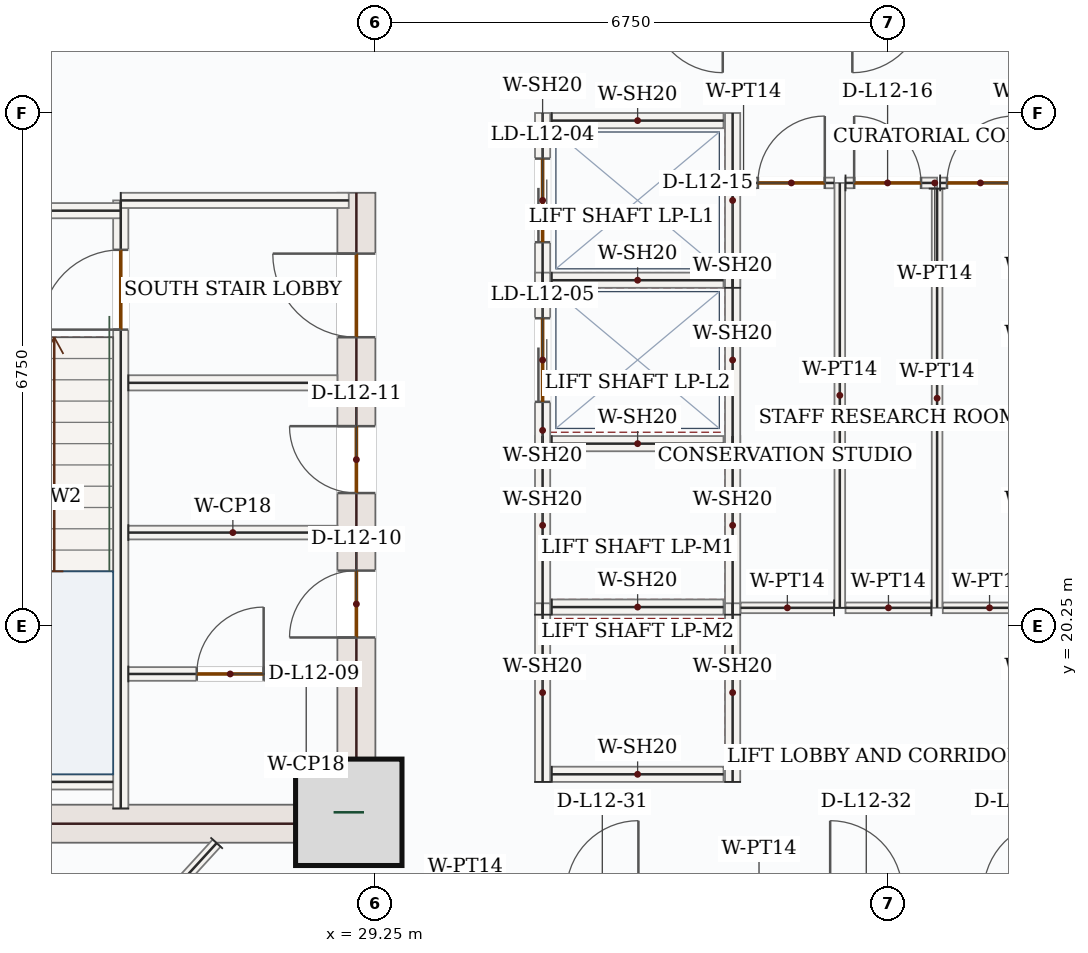
"""IFC4 building model, lengths in metres.
Left out: names, types, materials, properties, quantities, classifications, styles, units other than length and angle.
Written with IfcOpenShell. Run it as: python <this file> out.ifc"""

import sys

from ifc_helpers import new_model, si_unit, direction, frame, frame_2d, origin, origin_2d, place, context, subcontext, project, spatial, rectangle, extrude, source, transform, mapped, element, fill, save


model = new_model("IFC4")
c1 = context("Model", 3, precision=1e-05, world=origin(), true_north=direction((0.0, 1.0)))
c2 = subcontext(c1, "Body", "Model", "MODEL_VIEW")
j1 = project(units=[si_unit("LENGTHUNIT", "METRE"), si_unit("PLANEANGLEUNIT", "RADIAN")], contexts=[c1])
p1 = place(None, origin())
s1 = spatial("IfcSite", under=j1, at=p1, CompositionType="ELEMENT")
p2 = place(p1, origin())
s2 = spatial("IfcBuilding", under=s1, at=p2, CompositionType="ELEMENT")
p3 = place(p2, frame((0.0, 0.0, 58.5)))
s3 = spatial("IfcBuildingStorey", under=s2, at=p3, CompositionType="ELEMENT", Elevation=58.5)
p4 = place(p3, frame((29.0, 17.4, 0.0), z_axis=(0.0, 0.0, 1.0), x_axis=(0.0, 1.0, 0.0)))
e1 = element("IfcWall", 1, at=p4, inside=s3, PredefinedType="SHEAR", context=c2, shape_type="SweptSolid", body=[
    extrude(rectangle(XDim=8.55, YDim=0.5, at=frame_2d((4.275, 0.0))), origin(), (0.0, 0.0, 1.0), 3.95),
])
p5 = place(p4, frame((6.65, 0.0, 0.0)))
e2 = element("IfcOpeningElement", 2, at=p5, cuts=e1, PredefinedType="OPENING", context=c2, shape_type="SweptSolid", body=[
    extrude(rectangle(XDim=1.1, YDim=2.2, at=frame_2d((0.55, 1.1))), frame((0.0, 0.26, 0.0), z_axis=(0.0, -1.0, 0.0), x_axis=(1.0, 0.0, 0.0)), (0.0, 0.0, 1.0), 0.52),
])
p6 = place(p4, frame((2.7, 0.0, 0.0)))
e3 = element("IfcOpeningElement", 3, at=p6, cuts=e1, PredefinedType="OPENING", context=c2, shape_type="SweptSolid", body=[
    extrude(rectangle(XDim=0.88, YDim=2.1, at=frame_2d((0.44, 1.05))), frame((0.0, 0.26, 0.0), z_axis=(0.0, -1.0, 0.0), x_axis=(1.0, 0.0, 0.0)), (0.0, 0.0, 1.0), 0.52),
])
p7 = place(p4, frame((4.6, 0.0, 0.0)))
e4 = element("IfcOpeningElement", 4, at=p7, cuts=e1, PredefinedType="OPENING", context=c2, shape_type="SweptSolid", body=[
    extrude(rectangle(XDim=0.88, YDim=2.1, at=frame_2d((0.44, 1.05))), frame((0.0, 0.26, 0.0), z_axis=(0.0, -1.0, 0.0), x_axis=(1.0, 0.0, 0.0)), (0.0, 0.0, 1.0), 0.52),
])
m1 = source(origin(), c2, "Body", "SweptSolid", [
    extrude(rectangle(XDim=7.0, YDim=0.5, at=frame_2d((3.5, 0.0))), origin(), (0.0, 0.0, 1.0), 3.95),
])
p8 = place(p3, frame((21.75, 17.65, 0.0), z_axis=(0.0, 0.0, 1.0), x_axis=(1.0, 0.0, 0.0)))
e5 = element("IfcWall", 5, at=p8, inside=s3, PredefinedType="SHEAR", context=c2, shape_type="MappedRepresentation", body=[
    mapped(m1, transform((0.0, 0.0, 0.0), x_axis=(1.0, 0.0, 0.0), y_axis=(0.0, 1.0, 0.0), z_axis=(0.0, 0.0, 1.0), scale=1.0)),
])
m2 = source(origin(), c2, "Body", "SweptSolid", [
    extrude(rectangle(XDim=1.4, YDim=1.4, at=origin_2d()), origin(), (0.0, 0.0, 1.0), 4.2),
])
p9 = place(p3, frame((28.9, 17.8, 0.0), z_axis=(0.0, 0.0, 1.0), x_axis=(1.0, 0.0, 0.0)))
e6 = element("IfcColumn", 6, at=p9, inside=s3, PredefinedType="COLUMN", context=c2, shape_type="MappedRepresentation", body=[
    mapped(m2, transform((0.0, 0.0, 0.0), x_axis=(1.0, 0.0, 0.0), y_axis=(0.0, 1.0, 0.0), z_axis=(0.0, 0.0, 1.0), scale=1.0)),
])
p10 = place(p3, frame((25.9, 17.85, 0.0), z_axis=(0.0, 0.0, 1.0), x_axis=(0.0, 1.0, 0.0)))
e7 = element("IfcWall", 7, at=p10, inside=s3, PredefinedType="SOLIDWALL", context=c2, shape_type="SweptSolid", body=[
    extrude(rectangle(XDim=8.0, YDim=0.2, at=frame_2d((4.0, 0.0))), origin(), (0.0, 0.0, 1.0), 3.95),
])
p11 = place(p10, frame((6.3, 0.0, 0.0)))
e8 = element("IfcOpeningElement", 8, at=p11, cuts=e7, PredefinedType="OPENING", context=c2, shape_type="SweptSolid", body=[
    extrude(rectangle(XDim=1.05, YDim=2.15, at=frame_2d((0.525, 1.075))), frame((0.0, 0.11, 0.0), z_axis=(0.0, -1.0, 0.0), x_axis=(1.0, 0.0, 0.0)), (0.0, 0.0, 1.0), 0.22),
])
m3 = source(origin(), c2, "Body", "SweptSolid", [
    extrude(rectangle(XDim=4.25, YDim=0.2, at=frame_2d((2.125, 0.0))), origin(), (0.0, 0.0, 1.0), 3.95),
])
p12 = place(p3, frame((21.65, 25.715, 0.0), z_axis=(0.0, 0.0, 1.0), x_axis=(1.0, 0.0, 0.0)))
e9 = element("IfcWall", 9, at=p12, inside=s3, PredefinedType="SOLIDWALL", context=c2, shape_type="MappedRepresentation", body=[
    mapped(m3, transform((0.0, 0.0, 0.0), x_axis=(1.0, 0.0, 0.0), y_axis=(0.0, 1.0, 0.0), z_axis=(0.0, 0.0, 1.0), scale=1.0)),
])
m4 = source(origin(), c2, "Body", "SweptSolid", [
    extrude(rectangle(XDim=3.0, YDim=0.2, at=frame_2d((1.5, 0.0))), origin(), (0.0, 0.0, 1.0), 3.95),
])
p13 = place(p3, frame((25.9, 25.85, 0.0), z_axis=(0.0, 0.0, 1.0), x_axis=(1.0, 0.0, 0.0)))
e10 = element("IfcWall", 10, at=p13, inside=s3, PredefinedType="SOLIDWALL", context=c2, shape_type="MappedRepresentation", body=[
    mapped(m4, transform((0.0, 0.0, 0.0), x_axis=(1.0, 0.0, 0.0), y_axis=(0.0, 1.0, 0.0), z_axis=(0.0, 0.0, 1.0), scale=1.0)),
])
m5 = source(origin(), c2, "Body", "SweptSolid", [
    extrude(rectangle(XDim=3.25, YDim=0.2, at=frame_2d((1.625, 0.0))), origin(), (0.0, 0.0, 1.0), 3.95),
])
p14 = place(p3, frame((22.55, 18.2, 0.0), z_axis=(0.0, 0.0, 1.0), x_axis=(1.0, 0.0, 0.0)))
e11 = element("IfcWall", 11, at=p14, inside=s3, PredefinedType="SOLIDWALL", context=c2, shape_type="MappedRepresentation", body=[
    mapped(m5, transform((0.0, 0.0, 0.0), x_axis=(1.0, 0.0, 0.0), y_axis=(0.0, 1.0, 0.0), z_axis=(0.0, 0.0, 1.0), scale=1.0)),
])
m6 = source(origin(), c2, "Body", "SweptSolid", [
    extrude(rectangle(XDim=2.75, YDim=0.2, at=frame_2d((1.375, 0.0))), origin(), (0.0, 0.0, 1.0), 3.95),
])
p15 = place(p3, frame((26.0, 23.45, 0.0), z_axis=(0.0, 0.0, 1.0), x_axis=(1.0, 0.0, 0.0)))
e12 = element("IfcWall", 12, at=p15, inside=s3, PredefinedType="SOLIDWALL", context=c2, shape_type="MappedRepresentation", body=[
    mapped(m6, transform((0.0, 0.0, 0.0), x_axis=(1.0, 0.0, 0.0), y_axis=(0.0, 1.0, 0.0), z_axis=(0.0, 0.0, 1.0), scale=1.0)),
])
p16 = place(p3, frame((26.0, 19.62, 0.0), z_axis=(0.0, 0.0, 1.0), x_axis=(1.0, 0.0, 0.0)))
e13 = element("IfcWall", 13, at=p16, inside=s3, PredefinedType="PARTITIONING", context=c2, shape_type="SweptSolid", body=[
    extrude(rectangle(XDim=2.75, YDim=0.18, at=frame_2d((1.375, 0.0))), origin(), (0.0, 0.0, 1.0), 3.95),
])
p17 = place(p16, frame((0.9, 0.0, 0.0)))
e14 = element("IfcOpeningElement", 14, at=p17, cuts=e13, PredefinedType="OPENING", context=c2, shape_type="SweptSolid", body=[
    extrude(rectangle(XDim=0.88, YDim=2.1, at=frame_2d((0.44, 1.05))), frame((0.0, 0.1, 0.0), z_axis=(0.0, -1.0, 0.0), x_axis=(1.0, 0.0, 0.0)), (0.0, 0.0, 1.0), 0.2),
])
m7 = source(origin(), c2, "Body", "SweptSolid", [
    extrude(rectangle(XDim=2.75, YDim=0.18, at=frame_2d((1.375, 0.0))), origin(), (0.0, 0.0, 1.0), 3.95),
])
p18 = place(p3, frame((26.0, 21.48, 0.0), z_axis=(0.0, 0.0, 1.0), x_axis=(1.0, 0.0, 0.0)))
e15 = element("IfcWall", 15, at=p18, inside=s3, PredefinedType="PARTITIONING", context=c2, shape_type="MappedRepresentation", body=[
    mapped(m7, transform((0.0, 0.0, 0.0), x_axis=(1.0, 0.0, 0.0), y_axis=(0.0, 1.0, 0.0), z_axis=(0.0, 0.0, 1.0), scale=1.0)),
])
m8 = source(origin(), c2, "Body", "SweptSolid", [
    extrude(rectangle(XDim=2.35, YDim=0.2, at=frame_2d((1.175, 0.0))), origin(), (0.0, 0.0, 1.0), 3.95),
])
for number, where, z_axis, x_axis in (
    (16, (31.45, 20.4, 0.0), (0.0, 0.0, 1.0), (0.0, 1.0, 0.0)),
    (17, (33.95, 20.4, 0.0), (0.0, 0.0, 1.0), (0.0, 1.0, 0.0)),
):
    element("IfcWall", number, at=place(p3, frame(where, z_axis=z_axis, x_axis=x_axis)), inside=s3, PredefinedType="SOLIDWALL", context=c2, shape_type="MappedRepresentation", body=[
        mapped(m8, transform((0.0, 0.0, 0.0), x_axis=(1.0, 0.0, 0.0), y_axis=(0.0, 1.0, 0.0), z_axis=(0.0, 0.0, 1.0), scale=1.0)),
    ])
m9 = source(origin(), c2, "Body", "SweptSolid", [
    extrude(rectangle(XDim=2.26, YDim=0.2, at=frame_2d((1.13, 0.0))), origin(), (0.0, 0.0, 1.0), 3.95),
])
for number, where, z_axis, x_axis in (
    (18, (31.57, 20.5, 0.0), (0.0, 0.0, 1.0), (1.0, 0.0, 0.0)),
    (19, (31.57, 22.65, 0.0), (0.0, 0.0, 1.0), (1.0, 0.0, 0.0)),
):
    element("IfcWall", number, at=place(p3, frame(where, z_axis=z_axis, x_axis=x_axis)), inside=s3, PredefinedType="SOLIDWALL", context=c2, shape_type="MappedRepresentation", body=[
        mapped(m9, transform((0.0, 0.0, 0.0), x_axis=(1.0, 0.0, 0.0), y_axis=(0.0, 1.0, 0.0), z_axis=(0.0, 0.0, 1.0), scale=1.0)),
    ])
for number, where, z_axis, x_axis in (
    (20, (31.45, 18.2, 0.0), (0.0, 0.0, 1.0), (0.0, 1.0, 0.0)),
    (21, (33.95, 18.2, 0.0), (0.0, 0.0, 1.0), (0.0, 1.0, 0.0)),
):
    element("IfcWall", number, at=place(p3, frame(where, z_axis=z_axis, x_axis=x_axis)), inside=s3, PredefinedType="SOLIDWALL", context=c2, shape_type="MappedRepresentation", body=[
        mapped(m8, transform((0.0, 0.0, 0.0), x_axis=(1.0, 0.0, 0.0), y_axis=(0.0, 1.0, 0.0), z_axis=(0.0, 0.0, 1.0), scale=1.0)),
    ])
p19 = place(p3, frame((31.57, 18.3, 0.0), z_axis=(0.0, 0.0, 1.0), x_axis=(1.0, 0.0, 0.0)))
e22 = element("IfcWall", 22, at=p19, inside=s3, PredefinedType="SOLIDWALL", context=c2, shape_type="MappedRepresentation", body=[
    mapped(m9, transform((0.0, 0.0, 0.0), x_axis=(1.0, 0.0, 0.0), y_axis=(0.0, 1.0, 0.0), z_axis=(0.0, 0.0, 1.0), scale=1.0)),
])
p20 = place(p3, frame((31.45, 24.7, 0.0), z_axis=(0.0, 0.0, 1.0), x_axis=(0.0, 1.0, 0.0)))
e23 = element("IfcWall", 23, at=p20, inside=s3, PredefinedType="SOLIDWALL", context=c2, shape_type="SweptSolid", body=[
    extrude(rectangle(XDim=2.3, YDim=0.2, at=frame_2d((1.15, 0.0))), origin(), (0.0, 0.0, 1.0), 3.95),
])
p21 = place(p20, frame((0.6, 0.0, 0.0)))
e24 = element("IfcOpeningElement", 24, at=p21, cuts=e23, PredefinedType="OPENING", context=c2, shape_type="SweptSolid", body=[
    extrude(rectangle(XDim=1.1, YDim=2.15, at=frame_2d((0.55, 1.075))), frame((0.0, 0.11, 0.0), z_axis=(0.0, -1.0, 0.0), x_axis=(1.0, 0.0, 0.0)), (0.0, 0.0, 1.0), 0.22),
])
m10 = source(origin(), c2, "Body", "SweptSolid", [
    extrude(rectangle(XDim=2.3, YDim=0.2, at=frame_2d((1.15, 0.0))), origin(), (0.0, 0.0, 1.0), 3.95),
])
p22 = place(p3, frame((33.95, 24.7, 0.0), z_axis=(0.0, 0.0, 1.0), x_axis=(0.0, 1.0, 0.0)))
e25 = element("IfcWall", 25, at=p22, inside=s3, PredefinedType="SOLIDWALL", context=c2, shape_type="MappedRepresentation", body=[
    mapped(m10, transform((0.0, 0.0, 0.0), x_axis=(1.0, 0.0, 0.0), y_axis=(0.0, 1.0, 0.0), z_axis=(0.0, 0.0, 1.0), scale=1.0)),
])
for number, where, z_axis, x_axis in (
    (26, (31.57, 24.8, 0.0), (0.0, 0.0, 1.0), (1.0, 0.0, 0.0)),
    (27, (31.57, 26.9, 0.0), (0.0, 0.0, 1.0), (1.0, 0.0, 0.0)),
):
    element("IfcWall", number, at=place(p3, frame(where, z_axis=z_axis, x_axis=x_axis)), inside=s3, PredefinedType="SOLIDWALL", context=c2, shape_type="MappedRepresentation", body=[
        mapped(m9, transform((0.0, 0.0, 0.0), x_axis=(1.0, 0.0, 0.0), y_axis=(0.0, 1.0, 0.0), z_axis=(0.0, 0.0, 1.0), scale=1.0)),
    ])
p23 = place(p3, frame((31.45, 22.6, 0.0), z_axis=(0.0, 0.0, 1.0), x_axis=(0.0, 1.0, 0.0)))
e28 = element("IfcWall", 28, at=p23, inside=s3, PredefinedType="SOLIDWALL", context=c2, shape_type="SweptSolid", body=[
    extrude(rectangle(XDim=2.3, YDim=0.2, at=frame_2d((1.15, 0.0))), origin(), (0.0, 0.0, 1.0), 3.95),
])
p24 = place(p23, frame((0.6, 0.0, 0.0)))
e29 = element("IfcOpeningElement", 29, at=p24, cuts=e28, PredefinedType="OPENING", context=c2, shape_type="SweptSolid", body=[
    extrude(rectangle(XDim=1.1, YDim=2.15, at=frame_2d((0.55, 1.075))), frame((0.0, 0.11, 0.0), z_axis=(0.0, -1.0, 0.0), x_axis=(1.0, 0.0, 0.0)), (0.0, 0.0, 1.0), 0.22),
])
m11 = source(origin(), c2, "Body", "SweptSolid", [
    extrude(rectangle(XDim=2.3, YDim=0.2, at=frame_2d((1.15, 0.0))), origin(), (0.0, 0.0, 1.0), 3.95),
])
p25 = place(p3, frame((33.95, 22.6, 0.0), z_axis=(0.0, 0.0, 1.0), x_axis=(0.0, 1.0, 0.0)))
e30 = element("IfcWall", 30, at=p25, inside=s3, PredefinedType="SOLIDWALL", context=c2, shape_type="MappedRepresentation", body=[
    mapped(m11, transform((0.0, 0.0, 0.0), x_axis=(1.0, 0.0, 0.0), y_axis=(0.0, 1.0, 0.0), z_axis=(0.0, 0.0, 1.0), scale=1.0)),
])
m12 = source(origin(), c2, "Body", "SweptSolid", [
    extrude(rectangle(XDim=5.59, YDim=0.14, at=frame_2d((2.795, 0.0))), origin(), (0.0, 0.0, 1.0), 3.95),
])
p26 = place(p3, frame((35.36, 20.49, 0.0), z_axis=(0.0, 0.0, 1.0), x_axis=(0.0, 1.0, 0.0)))
e31 = element("IfcWall", 31, at=p26, inside=s3, PredefinedType="PARTITIONING", context=c2, shape_type="MappedRepresentation", body=[
    mapped(m12, transform((0.0, 0.0, 0.0), x_axis=(1.0, 0.0, 0.0), y_axis=(0.0, 1.0, 0.0), z_axis=(0.0, 0.0, 1.0), scale=1.0)),
])
p27 = place(p3, frame((35.435, 26.08, 0.0), z_axis=(0.0, 0.0, 1.0), x_axis=(1.0, 0.0, 0.0)))
e32 = element("IfcWall", 32, at=p27, inside=s3, PredefinedType="PARTITIONING", context=c2, shape_type="SweptSolid", body=[
    extrude(rectangle(XDim=1.205, YDim=0.14, at=frame_2d((0.603, 0.0))), origin(), (0.0, 0.0, 1.0), 3.95),
])
p28 = place(p27, frame((0.114, 0.0, 0.0)))
e33 = element("IfcOpeningElement", 33, at=p28, cuts=e32, PredefinedType="OPENING", context=c2, shape_type="SweptSolid", body=[
    extrude(rectangle(XDim=0.88, YDim=2.1, at=frame_2d((0.44, 1.05))), frame((0.0, 0.08, 0.0), z_axis=(0.0, -1.0, 0.0), x_axis=(1.0, 0.0, 0.0)), (0.0, 0.0, 1.0), 0.16),
])
m13 = source(origin(), c2, "Body", "SweptSolid", [
    extrude(rectangle(XDim=5.515, YDim=0.14, at=frame_2d((2.757, 0.0))), origin(), (0.0, 0.0, 1.0), 3.95),
])
p29 = place(p3, frame((36.64, 26.005, 0.0), z_axis=(0.0, 0.0, 1.0), x_axis=(0.0, -1.0, 0.0)))
e34 = element("IfcWall", 34, at=p29, inside=s3, PredefinedType="PARTITIONING", context=c2, shape_type="MappedRepresentation", body=[
    mapped(m13, transform((0.0, 0.0, 0.0), x_axis=(1.0, 0.0, 0.0), y_axis=(0.0, 1.0, 0.0), z_axis=(0.0, 0.0, 1.0), scale=1.0)),
])
m14 = source(origin(), c2, "Body", "SweptSolid", [
    extrude(rectangle(XDim=1.13, YDim=0.14, at=frame_2d((0.565, 0.0))), origin(), (0.0, 0.0, 1.0), 3.95),
])
p30 = place(p3, frame((36.565, 20.49, 0.0), z_axis=(0.0, 0.0, 1.0), x_axis=(-1.0, 0.0, 0.0)))
e35 = element("IfcWall", 35, at=p30, inside=s3, PredefinedType="PARTITIONING", context=c2, shape_type="MappedRepresentation", body=[
    mapped(m14, transform((0.0, 0.0, 0.0), x_axis=(1.0, 0.0, 0.0), y_axis=(0.0, 1.0, 0.0), z_axis=(0.0, 0.0, 1.0), scale=1.0)),
])
p31 = place(p3, frame((34.055, 26.08, 0.0), z_axis=(0.0, 0.0, 1.0), x_axis=(1.0, 0.0, 0.0)))
e36 = element("IfcWall", 36, at=p31, inside=s3, PredefinedType="PARTITIONING", context=c2, shape_type="SweptSolid", body=[
    extrude(rectangle(XDim=1.23, YDim=0.14, at=frame_2d((0.615, 0.0))), origin(), (0.0, 0.0, 1.0), 3.95),
])
p32 = place(p31, frame((0.228, 0.0, 0.0)))
e37 = element("IfcOpeningElement", 37, at=p32, cuts=e36, PredefinedType="OPENING", context=c2, shape_type="SweptSolid", body=[
    extrude(rectangle(XDim=0.88, YDim=2.1, at=frame_2d((0.44, 1.05))), frame((0.0, 0.08, 0.0), z_axis=(0.0, -1.0, 0.0), x_axis=(1.0, 0.0, 0.0)), (0.0, 0.0, 1.0), 0.16),
])
m15 = source(origin(), c2, "Body", "SweptSolid", [
    extrude(rectangle(XDim=1.23, YDim=0.14, at=frame_2d((0.615, 0.0))), origin(), (0.0, 0.0, 1.0), 3.95),
])
p33 = place(p3, frame((35.285, 20.49, 0.0), z_axis=(0.0, 0.0, 1.0), x_axis=(-1.0, 0.0, 0.0)))
e38 = element("IfcWall", 38, at=p33, inside=s3, PredefinedType="PARTITIONING", context=c2, shape_type="MappedRepresentation", body=[
    mapped(m15, transform((0.0, 0.0, 0.0), x_axis=(1.0, 0.0, 0.0), y_axis=(0.0, 1.0, 0.0), z_axis=(0.0, 0.0, 1.0), scale=1.0)),
])
p34 = place(p3, frame((36.68, 26.08, 0.0), z_axis=(0.0, 0.0, 1.0), x_axis=(1.0, 0.0, 0.0)))
e39 = element("IfcWall", 39, at=p34, inside=s3, PredefinedType="PARTITIONING", context=c2, shape_type="SweptSolid", body=[
    extrude(rectangle(XDim=1.265, YDim=0.14, at=frame_2d((0.633, 0.0))), origin(), (0.0, 0.0, 1.0), 3.95),
])
p35 = place(p34, frame((0.09, 0.0, 0.0)))
e40 = element("IfcOpeningElement", 40, at=p35, cuts=e39, PredefinedType="OPENING", context=c2, shape_type="SweptSolid", body=[
    extrude(rectangle(XDim=0.88, YDim=2.1, at=frame_2d((0.44, 1.05))), frame((0.0, 0.08, 0.0), z_axis=(0.0, -1.0, 0.0), x_axis=(1.0, 0.0, 0.0)), (0.0, 0.0, 1.0), 0.16),
])
p36 = place(p3, frame((37.945, 20.49, 0.0), z_axis=(0.0, 0.0, 1.0), x_axis=(-1.0, 0.0, 0.0)))
e41 = element("IfcWall", 41, at=p36, inside=s3, PredefinedType="PARTITIONING", context=c2, shape_type="MappedRepresentation", body=[
    mapped(m15, transform((0.0, 0.0, 0.0), x_axis=(1.0, 0.0, 0.0), y_axis=(0.0, 1.0, 0.0), z_axis=(0.0, 0.0, 1.0), scale=1.0)),
])
m16 = source(origin(), c2, "Body", "SweptSolid", [
    extrude(rectangle(XDim=3.375, YDim=0.14, at=frame_2d((1.688, 0.0))), origin(), (0.0, 0.0, 1.0), 3.95),
])
p37 = place(p3, frame((27.162, 17.395, 0.0), z_axis=(0.0, 0.0, 1.0), x_axis=(-0.674974079893, -0.737841440604, 0.0)))
e42 = element("IfcWall", 42, at=p37, inside=s3, PredefinedType="PARTITIONING", context=c2, shape_type="MappedRepresentation", body=[
    mapped(m16, transform((0.0, 0.0, 0.0), x_axis=(1.0, 0.0, 0.0), y_axis=(0.0, 1.0, 0.0), z_axis=(0.0, 0.0, 1.0), scale=1.0)),
])
m17 = source(origin(), c2, "Body", "SweptSolid", [
    extrude(rectangle(XDim=1.05, YDim=2.15, at=frame_2d((0.525, 1.075))), frame((0.0, 0.025, 0.0), z_axis=(0.0, -1.0, 0.0), x_axis=(1.0, 0.0, 0.0)), (0.0, 0.0, 1.0), 0.05),
])
p38 = place(p11, origin())
e43 = element("IfcDoor", 43, at=p38, inside=s3, OperationType="SINGLE_SWING_LEFT", PredefinedType="DOOR", context=c2, shape_type="MappedRepresentation", body=[
    mapped(m17, transform((0.0, 0.0, 0.0), x_axis=(1.0, 0.0, 0.0), y_axis=(0.0, 1.0, 0.0), z_axis=(0.0, 0.0, 1.0), scale=1.0)),
])
fill(e8, e43)
m18 = source(origin(), c2, "Body", "SweptSolid", [
    extrude(rectangle(XDim=1.1, YDim=2.2, at=frame_2d((0.55, 1.1))), frame((0.0, 0.025, 0.0), z_axis=(0.0, -1.0, 0.0), x_axis=(1.0, 0.0, 0.0)), (0.0, 0.0, 1.0), 0.05),
])
p39 = place(p5, origin())
e44 = element("IfcDoor", 44, at=p39, inside=s3, OperationType="SINGLE_SWING_RIGHT", PredefinedType="DOOR", context=c2, shape_type="MappedRepresentation", body=[
    mapped(m18, transform((0.0, 0.0, 0.0), x_axis=(1.0, 0.0, 0.0), y_axis=(0.0, 1.0, 0.0), z_axis=(0.0, 0.0, 1.0), scale=1.0)),
])
fill(e2, e44)
m19 = source(origin(), c2, "Body", "SweptSolid", [
    extrude(rectangle(XDim=0.88, YDim=2.1, at=frame_2d((0.44, 1.05))), frame((0.0, 0.025, 0.0), z_axis=(0.0, -1.0, 0.0), x_axis=(1.0, 0.0, 0.0)), (0.0, 0.0, 1.0), 0.05),
])
p40 = place(p17, origin())
e45 = element("IfcDoor", 45, at=p40, inside=s3, OperationType="SINGLE_SWING_RIGHT", PredefinedType="DOOR", context=c2, shape_type="MappedRepresentation", body=[
    mapped(m19, transform((0.0, 0.0, 0.0), x_axis=(1.0, 0.0, 0.0), y_axis=(0.0, 1.0, 0.0), z_axis=(0.0, 0.0, 1.0), scale=1.0)),
])
fill(e14, e45)
p41 = place(p6, origin())
e46 = element("IfcDoor", 46, at=p41, inside=s3, OperationType="SINGLE_SWING_LEFT", PredefinedType="DOOR", context=c2, shape_type="MappedRepresentation", body=[
    mapped(m19, transform((0.0, 0.0, 0.0), x_axis=(1.0, 0.0, 0.0), y_axis=(0.0, 1.0, 0.0), z_axis=(0.0, 0.0, 1.0), scale=1.0)),
])
fill(e3, e46)
p42 = place(p7, origin())
e47 = element("IfcDoor", 47, at=p42, inside=s3, OperationType="SINGLE_SWING_RIGHT", PredefinedType="DOOR", context=c2, shape_type="MappedRepresentation", body=[
    mapped(m19, transform((0.0, 0.0, 0.0), x_axis=(1.0, 0.0, 0.0), y_axis=(0.0, 1.0, 0.0), z_axis=(0.0, 0.0, 1.0), scale=1.0)),
])
fill(e4, e47)
m20 = source(origin(), c2, "Body", "SweptSolid", [
    extrude(rectangle(XDim=1.1, YDim=2.15, at=frame_2d((0.55, 1.075))), frame((0.0, 0.025, 0.0), z_axis=(0.0, -1.0, 0.0), x_axis=(1.0, 0.0, 0.0)), (0.0, 0.0, 1.0), 0.05),
])
p43 = place(p21, origin())
e48 = element("IfcDoor", 48, at=p43, inside=s3, OperationType="DOUBLE_DOOR_SLIDING", PredefinedType="DOOR", context=c2, shape_type="MappedRepresentation", body=[
    mapped(m20, transform((0.0, 0.0, 0.0), x_axis=(1.0, 0.0, 0.0), y_axis=(0.0, 1.0, 0.0), z_axis=(0.0, 0.0, 1.0), scale=1.0)),
])
fill(e24, e48)
p44 = place(p24, origin())
e49 = element("IfcDoor", 49, at=p44, inside=s3, OperationType="DOUBLE_DOOR_SLIDING", PredefinedType="DOOR", context=c2, shape_type="MappedRepresentation", body=[
    mapped(m20, transform((0.0, 0.0, 0.0), x_axis=(1.0, 0.0, 0.0), y_axis=(0.0, 1.0, 0.0), z_axis=(0.0, 0.0, 1.0), scale=1.0)),
])
fill(e29, e49)
p45 = place(p32, origin())
e50 = element("IfcDoor", 50, at=p45, inside=s3, OperationType="SINGLE_SWING_RIGHT", PredefinedType="DOOR", context=c2, shape_type="MappedRepresentation", body=[
    mapped(m19, transform((0.0, 0.0, 0.0), x_axis=(1.0, 0.0, 0.0), y_axis=(0.0, 1.0, 0.0), z_axis=(0.0, 0.0, 1.0), scale=1.0)),
])
fill(e37, e50)
p46 = place(p28, origin())
e51 = element("IfcDoor", 51, at=p46, inside=s3, OperationType="SINGLE_SWING_LEFT", PredefinedType="DOOR", context=c2, shape_type="MappedRepresentation", body=[
    mapped(m19, transform((0.0, 0.0, 0.0), x_axis=(1.0, 0.0, 0.0), y_axis=(0.0, 1.0, 0.0), z_axis=(0.0, 0.0, 1.0), scale=1.0)),
])
fill(e33, e51)
p47 = place(p35, origin())
e52 = element("IfcDoor", 52, at=p47, inside=s3, OperationType="SINGLE_SWING_RIGHT", PredefinedType="DOOR", context=c2, shape_type="MappedRepresentation", body=[
    mapped(m19, transform((0.0, 0.0, 0.0), x_axis=(1.0, 0.0, 0.0), y_axis=(0.0, 1.0, 0.0), z_axis=(0.0, 0.0, 1.0), scale=1.0)),
])
fill(e40, e52)
save(model, sys.argv[1])
